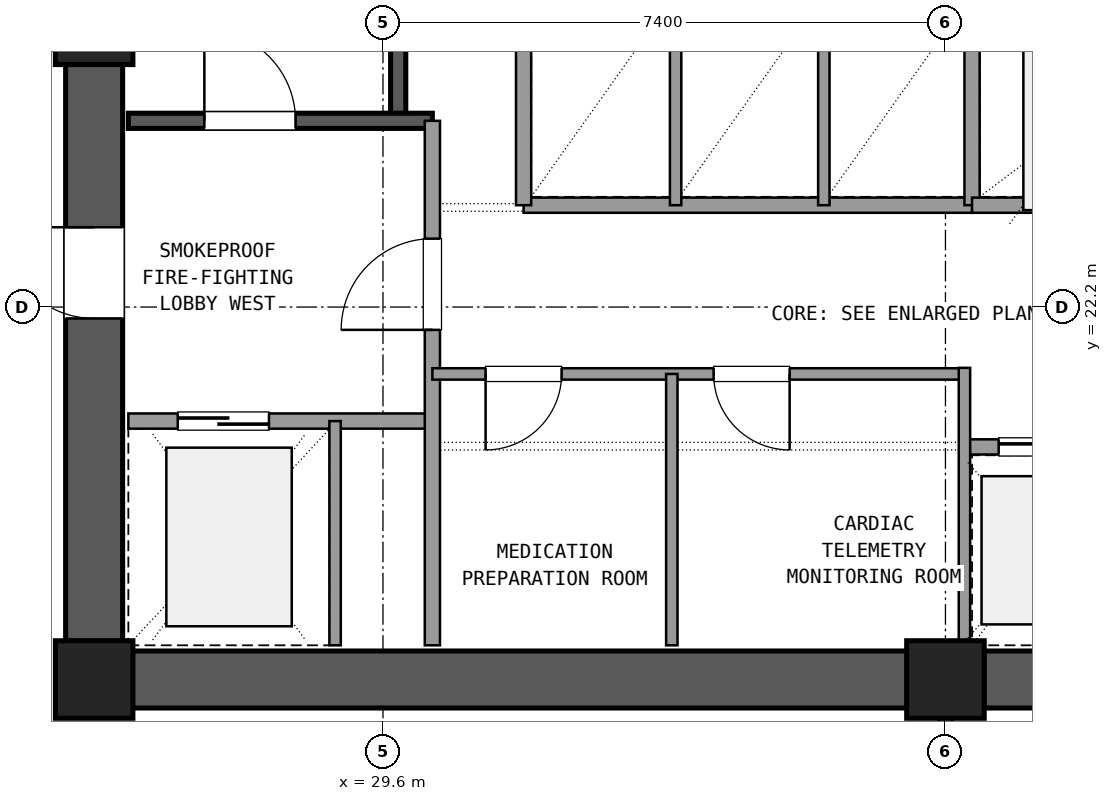
"""IFC4 building model, lengths in metres.
Left out: names, types, materials, properties, quantities, classifications, styles, units other than length and angle.
Written with IfcOpenShell. Run it as: python <this file> out.ifc"""

import sys

from ifc_helpers import new_model, si_unit, direction, frame, frame_2d, origin, origin_2d, place, context, subcontext, project, spatial, rectangle, extrude, element, fill, save


model = new_model("IFC4")
c1 = context("Model", 3, precision=1e-05, world=origin(), true_north=direction((0.0, 1.0)))
c2 = subcontext(c1, "Body", "Model", "MODEL_VIEW")
j1 = project(units=[si_unit("LENGTHUNIT", "METRE"), si_unit("PLANEANGLEUNIT", "RADIAN")], contexts=[c1])
p1 = place(None, origin())
s1 = spatial("IfcSite", under=j1, at=p1, CompositionType="ELEMENT")
p2 = place(p1, origin())
s2 = spatial("IfcBuilding", under=s1, at=p2, CompositionType="ELEMENT")
p3 = place(p2, frame((0.0, 0.0, 167.22)))
s3 = spatial("IfcBuildingStorey", under=s2, at=p3, CompositionType="ELEMENT", Elevation=167.22)
for number, where, z_axis, x_axis in (
    (1, (25.8, 17.3, 0.0), (0.0, 0.0, 1.0), (1.0, 0.0, 0.0)),
    (2, (37.0, 17.3, 0.0), (0.0, 0.0, 1.0), (1.0, 0.0, 0.0)),
    (3, (25.8, 25.9, 0.0), (0.0, 0.0, 1.0), (1.0, 0.0, 0.0)),
):
    element("IfcColumn", number, at=place(p3, frame(where, z_axis=z_axis, x_axis=x_axis)), inside=s3, PredefinedType="COLUMN", context=c2, shape_type="SweptSolid", body=[
        extrude(rectangle(XDim=1.02, YDim=1.02, at=origin_2d()), origin(), (0.0, 0.0, 1.0), 3.6),
    ])
for number, where, z_axis, x_axis in (
    (4, (26.305, 17.3, 0.0), (0.0, 0.0, 1.0), (1.0, 0.0, 0.0)),
    (5, (37.505, 17.3, 0.0), (0.0, 0.0, 1.0), (1.0, 0.0, 0.0)),
):
    element("IfcWall", number, at=place(p3, frame(where, z_axis=z_axis, x_axis=x_axis)), inside=s3, PredefinedType="SHEAR", context=c2, shape_type="SweptSolid", body=[
        extrude(rectangle(XDim=10.19, YDim=0.75, at=frame_2d((5.095, 0.0))), origin(), (0.0, 0.0, 1.0), 3.32),
    ])
p4 = place(p3, frame((25.8, 25.395, 0.0), z_axis=(0.0, 0.0, 1.0), x_axis=(0.0, -1.0, 0.0)))
e6 = element("IfcWall", 6, at=p4, inside=s3, PredefinedType="SHEAR", context=c2, shape_type="SweptSolid", body=[
    extrude(rectangle(XDim=7.59, YDim=0.75, at=frame_2d((3.795, 0.0))), origin(), (0.0, 0.0, 1.0), 3.32),
])
p5 = place(p4, frame((2.145, 0.0, 0.0)))
e7 = element("IfcOpeningElement", 7, at=p5, cuts=e6, PredefinedType="OPENING", context=c2, shape_type="SweptSolid", body=[
    extrude(rectangle(XDim=1.2, YDim=2.15, at=frame_2d((0.6, 1.075))), frame((0.0, 0.385, 0.0), z_axis=(0.0, -1.0, 0.0), x_axis=(1.0, 0.0, 0.0)), (0.0, 0.0, 1.0), 0.77),
])
p6 = place(p3, frame((29.8, 24.65, 0.0), z_axis=(0.0, 0.0, 1.0), x_axis=(0.0, 1.0, 0.0)))
e8 = element("IfcWall", 8, at=p6, inside=s3, PredefinedType="SHEAR", context=c2, shape_type="SweptSolid", body=[
    extrude(rectangle(XDim=9.4, YDim=0.2, at=frame_2d((4.7, 0.0))), origin(), (0.0, 0.0, 1.0), 3.32),
])
p7 = place(p3, frame((26.25, 24.65, 0.0), z_axis=(0.0, 0.0, 1.0), x_axis=(1.0, 0.0, 0.0)))
e9 = element("IfcWall", 9, at=p7, inside=s3, PredefinedType="SHEAR", context=c2, shape_type="SweptSolid", body=[
    extrude(rectangle(XDim=4.0, YDim=0.2, at=frame_2d((2.0, 0.0))), origin(), (0.0, 0.0, 1.0), 3.32),
])
p8 = place(p7, frame((1.0, 0.0, 0.0)))
e10 = element("IfcOpeningElement", 10, at=p8, cuts=e9, PredefinedType="OPENING", context=c2, shape_type="SweptSolid", body=[
    extrude(rectangle(XDim=1.2, YDim=2.15, at=frame_2d((0.6, 1.075))), frame((0.0, 0.11, 0.0), z_axis=(0.0, -1.0, 0.0), x_axis=(1.0, 0.0, 0.0)), (0.0, 0.0, 1.0), 0.22),
])
p9 = place(p3, frame((26.25, 20.7, 0.0), z_axis=(0.0, 0.0, 1.0), x_axis=(1.0, 0.0, 0.0)))
e11 = element("IfcWall", 11, at=p9, inside=s3, PredefinedType="SOLIDWALL", context=c2, shape_type="SweptSolid", body=[
    extrude(rectangle(XDim=4.0, YDim=0.2, at=frame_2d((2.0, 0.0))), origin(), (0.0, 0.0, 1.0), 2.61),
])
p10 = place(p9, frame((0.65, 0.0, 0.0)))
e12 = element("IfcOpeningElement", 12, at=p10, cuts=e11, PredefinedType="OPENING", context=c2, shape_type="SweptSolid", body=[
    extrude(rectangle(XDim=1.2, YDim=2.15, at=frame_2d((0.6, 1.075))), frame((0.0, 0.11, 0.0), z_axis=(0.0, -1.0, 0.0), x_axis=(1.0, 0.0, 0.0)), (0.0, 0.0, 1.0), 0.22),
])
p11 = place(p3, frame((30.25, 17.75, 0.0), z_axis=(0.0, 0.0, 1.0), x_axis=(0.0, 1.0, 0.0)))
e13 = element("IfcWall", 13, at=p11, inside=s3, PredefinedType="SOLIDWALL", context=c2, shape_type="SweptSolid", body=[
    extrude(rectangle(XDim=6.9, YDim=0.2, at=frame_2d((3.45, 0.0))), origin(), (0.0, 0.0, 1.0), 2.61),
])
p12 = place(p11, frame((4.15, 0.0, 0.0)))
e14 = element("IfcOpeningElement", 14, at=p12, cuts=e13, PredefinedType="OPENING", context=c2, shape_type="SweptSolid", body=[
    extrude(rectangle(XDim=1.2, YDim=2.15, at=frame_2d((0.6, 1.075))), frame((0.0, 0.11, 0.0), z_axis=(0.0, -1.0, 0.0), x_axis=(1.0, 0.0, 0.0)), (0.0, 0.0, 1.0), 0.22),
])
p13 = place(p3, frame((28.97, 17.75, 0.0), z_axis=(0.0, 0.0, 1.0), x_axis=(0.0, 1.0, 0.0)))
e15 = element("IfcWall", 15, at=p13, inside=s3, PredefinedType="PARTITIONING", context=c2, shape_type="SweptSolid", body=[
    extrude(rectangle(XDim=2.95, YDim=0.15, at=frame_2d((1.475, 0.0))), origin(), (0.0, 0.0, 1.0), 2.61),
])
p14 = place(p3, frame((30.25, 21.32, 0.0), z_axis=(0.0, 0.0, 1.0), x_axis=(1.0, 0.0, 0.0)))
e16 = element("IfcWall", 16, at=p14, inside=s3, PredefinedType="PARTITIONING", context=c2, shape_type="SweptSolid", body=[
    extrude(rectangle(XDim=7.0, YDim=0.15, at=frame_2d((3.5, 0.0))), origin(), (0.0, 0.0, 1.0), 2.61),
])
p15 = place(p14, frame((0.7, 0.0, 0.0)))
e17 = element("IfcOpeningElement", 17, at=p15, cuts=e16, PredefinedType="OPENING", context=c2, shape_type="SweptSolid", body=[
    extrude(rectangle(XDim=1.0, YDim=2.15, at=frame_2d((0.5, 1.075))), frame((0.0, 0.085, 0.0), z_axis=(0.0, -1.0, 0.0), x_axis=(1.0, 0.0, 0.0)), (0.0, 0.0, 1.0), 0.17),
])
p16 = place(p14, frame((3.7, 0.0, 0.0)))
e18 = element("IfcOpeningElement", 18, at=p16, cuts=e16, PredefinedType="OPENING", context=c2, shape_type="SweptSolid", body=[
    extrude(rectangle(XDim=1.0, YDim=2.15, at=frame_2d((0.5, 1.075))), frame((0.0, 0.085, 0.0), z_axis=(0.0, -1.0, 0.0), x_axis=(1.0, 0.0, 0.0)), (0.0, 0.0, 1.0), 0.17),
])
p17 = place(p3, frame((33.4, 17.75, 0.0), z_axis=(0.0, 0.0, 1.0), x_axis=(0.0, 1.0, 0.0)))
e19 = element("IfcWall", 19, at=p17, inside=s3, PredefinedType="PARTITIONING", context=c2, shape_type="SweptSolid", body=[
    extrude(rectangle(XDim=3.57, YDim=0.15, at=frame_2d((1.785, 0.0))), origin(), (0.0, 0.0, 1.0), 2.61),
])
p18 = place(p3, frame((37.25, 20.36, 0.0), z_axis=(0.0, 0.0, 1.0), x_axis=(1.0, 0.0, 0.0)))
e20 = element("IfcWall", 20, at=p18, inside=s3, PredefinedType="SOLIDWALL", context=c2, shape_type="SweptSolid", body=[
    extrude(rectangle(XDim=6.1, YDim=0.2, at=frame_2d((3.05, 0.0))), origin(), (0.0, 0.0, 1.0), 2.61),
])
p19 = place(p18, frame((0.45, 0.0, 0.0)))
e21 = element("IfcOpeningElement", 21, at=p19, cuts=e20, PredefinedType="OPENING", context=c2, shape_type="SweptSolid", body=[
    extrude(rectangle(XDim=1.1, YDim=2.15, at=frame_2d((0.55, 1.075))), frame((0.0, 0.11, 0.0), z_axis=(0.0, -1.0, 0.0), x_axis=(1.0, 0.0, 0.0)), (0.0, 0.0, 1.0), 0.22),
])
p20 = place(p18, frame((2.5, 0.0, 0.0)))
e22 = element("IfcOpeningElement", 22, at=p20, cuts=e20, PredefinedType="OPENING", context=c2, shape_type="SweptSolid", body=[
    extrude(rectangle(XDim=1.1, YDim=2.15, at=frame_2d((0.55, 1.075))), frame((0.0, 0.11, 0.0), z_axis=(0.0, -1.0, 0.0), x_axis=(1.0, 0.0, 0.0)), (0.0, 0.0, 1.0), 0.22),
])
p21 = place(p18, frame((4.55, 0.0, 0.0)))
e23 = element("IfcOpeningElement", 23, at=p21, cuts=e20, PredefinedType="OPENING", context=c2, shape_type="SweptSolid", body=[
    extrude(rectangle(XDim=1.1, YDim=2.15, at=frame_2d((0.55, 1.075))), frame((0.0, 0.11, 0.0), z_axis=(0.0, -1.0, 0.0), x_axis=(1.0, 0.0, 0.0)), (0.0, 0.0, 1.0), 0.22),
])
p22 = place(p3, frame((37.25, 17.75, 0.0), z_axis=(0.0, 0.0, 1.0), x_axis=(0.0, 1.0, 0.0)))
e24 = element("IfcWall", 24, at=p22, inside=s3, PredefinedType="PARTITIONING", context=c2, shape_type="SweptSolid", body=[
    extrude(rectangle(XDim=3.65, YDim=0.15, at=frame_2d((1.825, 0.0))), origin(), (0.0, 0.0, 1.0), 2.61),
])
p23 = place(p3, frame((31.45, 23.54, 0.0), z_axis=(0.0, 0.0, 1.0), x_axis=(1.0, 0.0, 0.0)))
e25 = element("IfcWall", 25, at=p23, inside=s3, PredefinedType="SOLIDWALL", context=c2, shape_type="SweptSolid", body=[
    extrude(rectangle(XDim=5.9, YDim=0.2, at=frame_2d((2.95, 0.0))), origin(), (0.0, 0.0, 1.0), 2.61),
])
p24 = place(p3, frame((31.45, 23.54, 0.0), z_axis=(0.0, 0.0, 1.0), x_axis=(0.0, 1.0, 0.0)))
e26 = element("IfcWall", 26, at=p24, inside=s3, PredefinedType="SOLIDWALL", context=c2, shape_type="SweptSolid", body=[
    extrude(rectangle(XDim=2.81, YDim=0.2, at=frame_2d((1.405, 0.0))), origin(), (0.0, 0.0, 1.0), 2.61),
])
for number, where, z_axis, x_axis in (
    (27, (33.45, 23.54, 0.0), (0.0, 0.0, 1.0), (0.0, 1.0, 0.0)),
    (28, (35.4, 23.54, 0.0), (0.0, 0.0, 1.0), (0.0, 1.0, 0.0)),
):
    element("IfcWall", number, at=place(p3, frame(where, z_axis=z_axis, x_axis=x_axis)), inside=s3, PredefinedType="PARTITIONING", context=c2, shape_type="SweptSolid", body=[
        extrude(rectangle(XDim=2.81, YDim=0.15, at=frame_2d((1.405, 0.0))), origin(), (0.0, 0.0, 1.0), 2.61),
    ])
p25 = place(p3, frame((37.35, 23.54, 0.0), z_axis=(0.0, 0.0, 1.0), x_axis=(0.0, 1.0, 0.0)))
e29 = element("IfcWall", 29, at=p25, inside=s3, PredefinedType="SOLIDWALL", context=c2, shape_type="SweptSolid", body=[
    extrude(rectangle(XDim=6.82, YDim=0.2, at=frame_2d((3.41, 0.0))), origin(), (0.0, 0.0, 1.0), 2.61),
])
p26 = place(p3, frame((37.35, 23.54, 0.0), z_axis=(0.0, 0.0, 1.0), x_axis=(1.0, 0.0, 0.0)))
e30 = element("IfcWall", 30, at=p26, inside=s3, PredefinedType="SOLIDWALL", context=c2, shape_type="SweptSolid", body=[
    extrude(rectangle(XDim=3.05, YDim=0.2, at=frame_2d((1.525, 0.0))), origin(), (0.0, 0.0, 1.0), 2.61),
])
p27 = place(p3, frame((37.0, 13.64, 0.0), z_axis=(0.0, 0.0, 1.0), x_axis=(0.0, 1.0, 0.0)))
e31 = element("IfcWall", 31, at=p27, inside=s3, PredefinedType="PARTITIONING", context=c2, shape_type="SweptSolid", body=[
    extrude(rectangle(XDim=3.21, YDim=0.18, at=frame_2d((1.605, 0.0))), origin(), (0.0, 0.0, 1.0), 2.61),
])
p28 = place(p27, frame((0.605, 0.0, 0.0)))
e32 = element("IfcOpeningElement", 32, at=p28, cuts=e31, PredefinedType="OPENING", context=c2, shape_type="SweptSolid", body=[
    extrude(rectangle(XDim=2.0, YDim=2.2, at=frame_2d((1.0, 1.1))), frame((0.0, 0.1, 0.0), z_axis=(0.0, -1.0, 0.0), x_axis=(1.0, 0.0, 0.0)), (0.0, 0.0, 1.0), 0.2),
])
p29 = place(p8, origin())
e33 = element("IfcDoor", 33, at=p29, inside=s3, OperationType="SINGLE_SWING_LEFT", PredefinedType="DOOR", context=c2, shape_type="SweptSolid", body=[
    extrude(rectangle(XDim=1.2, YDim=2.15, at=frame_2d((0.6, 1.075))), frame((0.0, 0.025, 0.0), z_axis=(0.0, -1.0, 0.0), x_axis=(1.0, 0.0, 0.0)), (0.0, 0.0, 1.0), 0.05),
])
fill(e10, e33)
p30 = place(p10, origin())
e34 = element("IfcDoor", 34, at=p30, inside=s3, OperationType="SLIDING_TO_LEFT", PredefinedType="DOOR", context=c2, shape_type="SweptSolid", body=[
    extrude(rectangle(XDim=1.2, YDim=2.15, at=frame_2d((0.6, 1.075))), frame((0.0, 0.025, 0.0), z_axis=(0.0, -1.0, 0.0), x_axis=(1.0, 0.0, 0.0)), (0.0, 0.0, 1.0), 0.05),
])
fill(e12, e34)
p31 = place(p12, origin())
e35 = element("IfcDoor", 35, at=p31, inside=s3, OperationType="SINGLE_SWING_LEFT", PredefinedType="DOOR", context=c2, shape_type="SweptSolid", body=[
    extrude(rectangle(XDim=1.2, YDim=2.15, at=frame_2d((0.6, 1.075))), frame((0.0, 0.025, 0.0), z_axis=(0.0, -1.0, 0.0), x_axis=(1.0, 0.0, 0.0)), (0.0, 0.0, 1.0), 0.05),
])
fill(e14, e35)
p32 = place(p5, frame((1.2, 0.0, 0.0), z_axis=(0.0, 0.0, 1.0), x_axis=(-1.0, 0.0, 0.0)))
e36 = element("IfcDoor", 36, at=p32, inside=s3, OperationType="SINGLE_SWING_LEFT", PredefinedType="DOOR", context=c2, shape_type="SweptSolid", body=[
    extrude(rectangle(XDim=1.2, YDim=2.15, at=frame_2d((0.6, 1.075))), frame((0.0, 0.025, 0.0), z_axis=(0.0, -1.0, 0.0), x_axis=(1.0, 0.0, 0.0)), (0.0, 0.0, 1.0), 0.05),
])
fill(e7, e36)
p33 = place(p15, frame((1.0, 0.0, 0.0), z_axis=(0.0, 0.0, 1.0), x_axis=(-1.0, 0.0, 0.0)))
e37 = element("IfcDoor", 37, at=p33, inside=s3, OperationType="SINGLE_SWING_LEFT", PredefinedType="DOOR", context=c2, shape_type="SweptSolid", body=[
    extrude(rectangle(XDim=1.0, YDim=2.15, at=frame_2d((0.5, 1.075))), frame((0.0, 0.025, 0.0), z_axis=(0.0, -1.0, 0.0), x_axis=(1.0, 0.0, 0.0)), (0.0, 0.0, 1.0), 0.05),
])
fill(e17, e37)
p34 = place(p16, frame((1.0, 0.0, 0.0), z_axis=(0.0, 0.0, 1.0), x_axis=(-1.0, 0.0, 0.0)))
e38 = element("IfcDoor", 38, at=p34, inside=s3, OperationType="SINGLE_SWING_RIGHT", PredefinedType="DOOR", context=c2, shape_type="SweptSolid", body=[
    extrude(rectangle(XDim=1.0, YDim=2.15, at=frame_2d((0.5, 1.075))), frame((0.0, 0.025, 0.0), z_axis=(0.0, -1.0, 0.0), x_axis=(1.0, 0.0, 0.0)), (0.0, 0.0, 1.0), 0.05),
])
fill(e18, e38)
p35 = place(p19, origin())
e39 = element("IfcDoor", 39, at=p35, inside=s3, OperationType="SLIDING_TO_LEFT", PredefinedType="DOOR", context=c2, shape_type="SweptSolid", body=[
    extrude(rectangle(XDim=1.1, YDim=2.15, at=frame_2d((0.55, 1.075))), frame((0.0, 0.025, 0.0), z_axis=(0.0, -1.0, 0.0), x_axis=(1.0, 0.0, 0.0)), (0.0, 0.0, 1.0), 0.05),
])
fill(e21, e39)
save(model, sys.argv[1])
